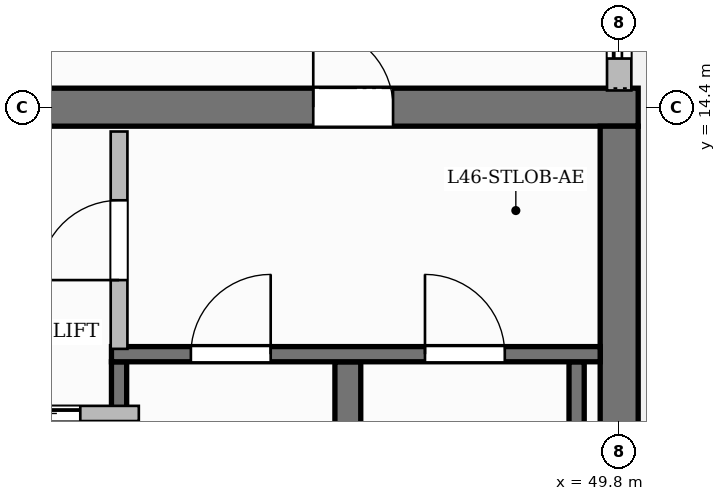
"""IFC4 building model, lengths in metres.
Left out: names, types, materials, properties, quantities, classifications, styles, units other than length and angle.
Written with IfcOpenShell. Run it as: python <this file> out.ifc"""

import sys

from ifc_helpers import new_model, si_unit, direction, frame, frame_2d, origin, place, context, subcontext, project, spatial, rectangle, extrude, source, transform, mapped, element, fill, save


model = new_model("IFC4")
c1 = context("Model", 3, precision=1e-05, world=origin(), true_north=direction((0.0, 1.0)))
c2 = subcontext(c1, "Body", "Model", "MODEL_VIEW")
j1 = project(units=[si_unit("LENGTHUNIT", "METRE"), si_unit("PLANEANGLEUNIT", "RADIAN")], contexts=[c1])
p1 = place(None, origin())
s1 = spatial("IfcSite", under=j1, at=p1, CompositionType="ELEMENT")
p2 = place(p1, origin())
s2 = spatial("IfcBuilding", under=s1, at=p2, CompositionType="ELEMENT")
p3 = place(p2, frame((0.0, 0.0, 184.95)))
s3 = spatial("IfcBuildingStorey", under=s2, at=p3, CompositionType="ELEMENT", Elevation=184.95)
p4 = place(p3, frame((34.55, 14.4, 0.0), z_axis=(0.0, 0.0, 1.0), x_axis=(1.0, 0.0, 0.0)))
e1 = element("IfcWall", 1, at=p4, inside=s3, PredefinedType="SHEAR", context=c2, shape_type="SweptSolid", body=[
    extrude(rectangle(XDim=15.5, YDim=0.5, at=frame_2d((7.75, 0.0))), origin(), (0.0, 0.0, 1.0), 3.85),
])
p5 = place(p4, frame((5.38, 0.0, 0.0)))
e2 = element("IfcOpeningElement", 2, at=p5, cuts=e1, PredefinedType="OPENING", context=c2, shape_type="SweptSolid", body=[
    extrude(rectangle(XDim=1.5, YDim=2.2, at=frame_2d((0.75, 1.1))), frame((0.0, 0.26, 0.0), z_axis=(0.0, -1.0, 0.0), x_axis=(1.0, 0.0, 0.0)), (0.0, 0.0, 1.0), 0.52),
])
p6 = place(p4, frame((1.595, 0.0, 0.0)))
e3 = element("IfcOpeningElement", 3, at=p6, cuts=e1, PredefinedType="OPENING", context=c2, shape_type="SweptSolid", body=[
    extrude(rectangle(XDim=1.05, YDim=2.15, at=frame_2d((0.525, 1.075))), frame((0.0, 0.26, 0.0), z_axis=(0.0, -1.0, 0.0), x_axis=(1.0, 0.0, 0.0)), (0.0, 0.0, 1.0), 0.52),
])
p7 = place(p4, frame((11.225, 0.0, 0.0)))
e4 = element("IfcOpeningElement", 4, at=p7, cuts=e1, PredefinedType="OPENING", context=c2, shape_type="SweptSolid", body=[
    extrude(rectangle(XDim=1.05, YDim=2.15, at=frame_2d((0.525, 1.075))), frame((0.0, 0.26, 0.0), z_axis=(0.0, -1.0, 0.0), x_axis=(1.0, 0.0, 0.0)), (0.0, 0.0, 1.0), 0.52),
])
p8 = place(p3, frame((49.8, 3.85, 0.0), z_axis=(0.0, 0.0, 1.0), x_axis=(0.0, 1.0, 0.0)))
e5 = element("IfcWall", 5, at=p8, inside=s3, PredefinedType="SHEAR", context=c2, shape_type="SweptSolid", body=[
    extrude(rectangle(XDim=10.3, YDim=0.5, at=frame_2d((5.15, 0.0))), origin(), (0.0, 0.0, 1.0), 3.85),
])
p9 = place(p3, frame((43.22, 4.1, 0.0), z_axis=(0.0, 0.0, 1.0), x_axis=(0.0, 1.0, 0.0)))
e6 = element("IfcWall", 6, at=p9, inside=s3, PredefinedType="SHEAR", context=c2, shape_type="SweptSolid", body=[
    extrude(rectangle(XDim=6.95, YDim=0.2, at=frame_2d((3.475, 0.0))), origin(), (0.0, 0.0, 1.0), 3.85),
])
p10 = place(p3, frame((46.23, 4.1, 0.0), z_axis=(0.0, 0.0, 1.0), x_axis=(0.0, 1.0, 0.0)))
e7 = element("IfcWall", 7, at=p10, inside=s3, PredefinedType="SHEAR", context=c2, shape_type="SweptSolid", body=[
    extrude(rectangle(XDim=6.95, YDim=0.34, at=frame_2d((3.475, 0.0))), origin(), (0.0, 0.0, 1.0), 3.85),
])
p11 = place(p3, frame((49.24, 4.1, 0.0), z_axis=(0.0, 0.0, 1.0), x_axis=(0.0, 1.0, 0.0)))
e8 = element("IfcWall", 8, at=p11, inside=s3, PredefinedType="SHEAR", context=c2, shape_type="SweptSolid", body=[
    extrude(rectangle(XDim=6.95, YDim=0.2, at=frame_2d((3.475, 0.0))), origin(), (0.0, 0.0, 1.0), 3.85),
])
p12 = place(p3, frame((43.12, 11.15, 0.0), z_axis=(0.0, 0.0, 1.0), x_axis=(1.0, 0.0, 0.0)))
e9 = element("IfcWall", 9, at=p12, inside=s3, PredefinedType="SHEAR", context=c2, shape_type="SweptSolid", body=[
    extrude(rectangle(XDim=6.43, YDim=0.2, at=frame_2d((3.215, 0.0))), origin(), (0.0, 0.0, 1.0), 3.85),
])
p13 = place(p12, frame((1.045, 0.0, 0.0)))
e10 = element("IfcOpeningElement", 10, at=p13, cuts=e9, PredefinedType="OPENING", context=c2, shape_type="SweptSolid", body=[
    extrude(rectangle(XDim=1.05, YDim=2.2, at=frame_2d((0.525, 1.1))), frame((0.0, 0.11, 0.0), z_axis=(0.0, -1.0, 0.0), x_axis=(1.0, 0.0, 0.0)), (0.0, 0.0, 1.0), 0.22),
])
p14 = place(p12, frame((4.125, 0.0, 0.0)))
e11 = element("IfcOpeningElement", 11, at=p14, cuts=e9, PredefinedType="OPENING", context=c2, shape_type="SweptSolid", body=[
    extrude(rectangle(XDim=1.05, YDim=2.2, at=frame_2d((0.525, 1.1))), frame((0.0, 0.11, 0.0), z_axis=(0.0, -1.0, 0.0), x_axis=(1.0, 0.0, 0.0)), (0.0, 0.0, 1.0), 0.22),
])
p15 = place(p3, frame((43.22, 11.22, 0.0), z_axis=(0.0, 0.0, 1.0), x_axis=(0.0, 1.0, 0.0)))
e12 = element("IfcWall", 12, at=p15, inside=s3, PredefinedType="PARTITIONING", context=c2, shape_type="SweptSolid", body=[
    extrude(rectangle(XDim=2.86, YDim=0.22, at=frame_2d((1.43, 0.0))), origin(), (0.0, 0.0, 1.0), 3.6),
])
p16 = place(p15, frame((0.905, 0.0, 0.0)))
e13 = element("IfcOpeningElement", 13, at=p16, cuts=e12, PredefinedType="OPENING", context=c2, shape_type="SweptSolid", body=[
    extrude(rectangle(XDim=1.05, YDim=2.15, at=frame_2d((0.525, 1.075))), frame((0.0, 0.12, 0.0), z_axis=(0.0, -1.0, 0.0), x_axis=(1.0, 0.0, 0.0)), (0.0, 0.0, 1.0), 0.24),
])
p17 = place(p3, frame((40.84, 10.37, 0.0), z_axis=(0.0, 0.0, 1.0), x_axis=(1.0, 0.0, 0.0)))
e14 = element("IfcWall", 14, at=p17, inside=s3, PredefinedType="PARTITIONING", context=c2, shape_type="SweptSolid", body=[
    extrude(rectangle(XDim=2.64, YDim=0.2, at=frame_2d((1.32, 0.0))), origin(), (0.0, 0.0, 1.0), 3.6),
])
p18 = place(p17, frame((0.77, 0.0, 0.0)))
e15 = element("IfcOpeningElement", 15, at=p18, cuts=e14, PredefinedType="OPENING", context=c2, shape_type="SweptSolid", body=[
    extrude(rectangle(XDim=1.1, YDim=2.2, at=frame_2d((0.55, 1.1))), frame((0.0, 0.11, 0.0), z_axis=(0.0, -1.0, 0.0), x_axis=(1.0, 0.0, 0.0)), (0.0, 0.0, 1.0), 0.22),
])
p19 = place(p3, frame((49.8, 14.62, 0.0), z_axis=(0.0, 0.0, 1.0), x_axis=(0.0, 1.0, 0.0)))
e16 = element("IfcWall", 16, at=p19, inside=s3, PredefinedType="SOLIDWALL", context=c2, shape_type="SweptSolid", body=[
    extrude(rectangle(XDim=6.93, YDim=0.32, at=frame_2d((3.465, 0.0))), origin(), (0.0, 0.0, 1.0), 3.085),
])
p20 = place(p19, frame((0.42, 0.0, 0.0)))
e17 = element("IfcOpeningElement", 17, at=p20, cuts=e16, PredefinedType="OPENING", context=c2, shape_type="SweptSolid", body=[
    extrude(rectangle(XDim=1.2, YDim=2.2, at=frame_2d((0.6, 1.1))), frame((0.0, 0.17, 0.0), z_axis=(0.0, -1.0, 0.0), x_axis=(1.0, 0.0, 0.0)), (0.0, 0.0, 1.0), 0.34),
])
p21 = place(p19, frame((3.384, 0.0, 0.8)))
e18 = element("IfcOpeningElement", 18, at=p21, cuts=e16, PredefinedType="OPENING", context=c2, shape_type="SweptSolid", body=[
    extrude(rectangle(XDim=1.8, YDim=1.85, at=frame_2d((0.9, 0.925))), frame((0.0, 0.17, 0.0), z_axis=(0.0, -1.0, 0.0), x_axis=(1.0, 0.0, 0.0)), (0.0, 0.0, 1.0), 0.34),
])
m1 = source(origin(), c2, "Body", "SweptSolid", [
    extrude(rectangle(XDim=1.05, YDim=2.2, at=frame_2d((0.525, 1.1))), frame((0.0, 0.025, 0.0), z_axis=(0.0, -1.0, 0.0), x_axis=(1.0, 0.0, 0.0)), (0.0, 0.0, 1.0), 0.05),
])
p22 = place(p13, origin())
e19 = element("IfcDoor", 19, at=p22, inside=s3, OperationType="SINGLE_SWING_RIGHT", PredefinedType="DOOR", context=c2, shape_type="MappedRepresentation", body=[
    mapped(m1, transform((0.0, 0.0, 0.0), scale=1.0)),
])
fill(e10, e19)
p23 = place(p14, origin())
e20 = element("IfcDoor", 20, at=p23, inside=s3, OperationType="SINGLE_SWING_LEFT", PredefinedType="DOOR", context=c2, shape_type="MappedRepresentation", body=[
    mapped(m1, transform((0.0, 0.0, 0.0), scale=1.0)),
])
fill(e11, e20)
m2 = source(origin(), c2, "Body", "SweptSolid", [
    extrude(rectangle(XDim=1.05, YDim=2.15, at=frame_2d((0.525, 1.075))), frame((0.0, 0.025, 0.0), z_axis=(0.0, -1.0, 0.0), x_axis=(1.0, 0.0, 0.0)), (0.0, 0.0, 1.0), 0.05),
])
p24 = place(p16, origin())
e21 = element("IfcDoor", 21, at=p24, inside=s3, OperationType="SINGLE_SWING_LEFT", PredefinedType="DOOR", context=c2, shape_type="MappedRepresentation", body=[
    mapped(m2, transform((0.0, 0.0, 0.0), scale=1.0)),
])
fill(e13, e21)
p25 = place(p7, origin())
e22 = element("IfcDoor", 22, at=p25, inside=s3, OperationType="SINGLE_SWING_LEFT", PredefinedType="DOOR", context=c2, shape_type="MappedRepresentation", body=[
    mapped(m2, transform((0.0, 0.0, 0.0), scale=1.0)),
])
fill(e4, e22)
m3 = source(origin(), c2, "Body", "SweptSolid", [
    extrude(rectangle(XDim=1.1, YDim=2.2, at=frame_2d((0.55, 1.1))), frame((0.0, 0.025, 0.0), z_axis=(0.0, -1.0, 0.0), x_axis=(1.0, 0.0, 0.0)), (0.0, 0.0, 1.0), 0.05),
])
p26 = place(p18, origin())
e23 = element("IfcDoor", 23, at=p26, inside=s3, OperationType="SLIDING_TO_LEFT", PredefinedType="DOOR", context=c2, shape_type="MappedRepresentation", body=[
    mapped(m3, transform((0.0, 0.0, 0.0), scale=1.0)),
])
fill(e15, e23)
m4 = source(origin(), c2, "Body", "SweptSolid", [
    extrude(rectangle(XDim=1.2, YDim=2.2, at=frame_2d((0.6, 1.1))), frame((0.0, 0.025, 0.0), z_axis=(0.0, -1.0, 0.0), x_axis=(1.0, 0.0, 0.0)), (0.0, 0.0, 1.0), 0.05),
])
p27 = place(p20, origin())
e24 = element("IfcDoor", 24, at=p27, inside=s3, OperationType="SLIDING_TO_LEFT", PredefinedType="DOOR", context=c2, shape_type="MappedRepresentation", body=[
    mapped(m4, transform((0.0, 0.0, 0.0), scale=1.0)),
])
fill(e17, e24)
save(model, sys.argv[1])
